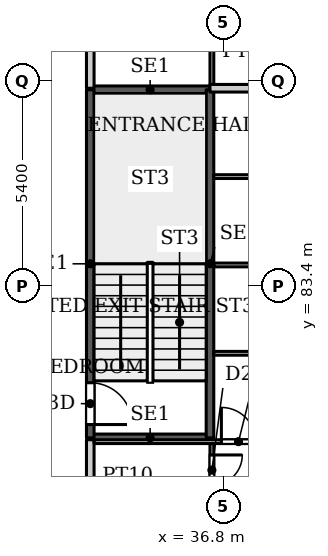
"""IFC4 building model, lengths in metres.
Left out: names, types, materials, properties, quantities, classifications, styles, units other than length and angle.
Written with IfcOpenShell. Run it as: python <this file> out.ifc"""

import sys

from ifc_helpers import new_model, si_unit, direction, frame, frame_2d, origin, place, context, subcontext, project, spatial, rectangle, extrude, source, transform, mapped, element, fill, save


model = new_model("IFC4")
c1 = context("Model", 3, precision=1e-05, world=origin(), true_north=direction((0.0, 1.0)))
c2 = subcontext(c1, "Body", "Model", "MODEL_VIEW")
j1 = project(units=[si_unit("LENGTHUNIT", "METRE"), si_unit("PLANEANGLEUNIT", "RADIAN")], contexts=[c1])
p1 = place(None, origin())
s1 = spatial("IfcSite", under=j1, at=p1, CompositionType="ELEMENT")
p2 = place(p1, origin())
s2 = spatial("IfcBuilding", under=s1, at=p2, CompositionType="ELEMENT")
p3 = place(p2, frame((0.0, 0.0, 129.2)))
s3 = spatial("IfcBuildingStorey", under=s2, at=p3, CompositionType="ELEMENT", Elevation=129.2)
for number, where, z_axis, x_axis in (
    (1, (33.3, 79.4, 0.0), (0.0, 0.0, 1.0), (1.0, 0.0, 0.0)),
    (2, (33.3, 88.56, 0.0), (0.0, 0.0, 1.0), (1.0, 0.0, 0.0)),
):
    element("IfcWall", number, at=place(p3, frame(where, z_axis=z_axis, x_axis=x_axis)), inside=s3, PredefinedType="SHEAR", context=c2, shape_type="SweptSolid", body=[
        extrude(rectangle(XDim=3.15, YDim=0.2, at=frame_2d((1.575, 0.0))), origin(), (0.0, 0.0, 1.0), 3.9),
    ])
p4 = place(p3, frame((33.3, 79.4, 0.0), z_axis=(0.0, 0.0, 1.0), x_axis=(0.0, 1.0, 0.0)))
e3 = element("IfcWall", 3, at=p4, inside=s3, PredefinedType="SHEAR", context=c2, shape_type="SweptSolid", body=[
    extrude(rectangle(XDim=9.16, YDim=0.2, at=frame_2d((4.58, 0.0))), origin(), (0.0, 0.0, 1.0), 3.9),
])
p5 = place(p4, frame((0.35, 0.0, 0.0)))
e4 = element("IfcOpeningElement", 4, at=p5, cuts=e3, PredefinedType="OPENING", context=c2, shape_type="SweptSolid", body=[
    extrude(rectangle(XDim=1.1, YDim=2.2, at=frame_2d((0.55, 1.1))), frame((0.0, 0.11, 0.0), z_axis=(0.0, -1.0, 0.0), x_axis=(1.0, 0.0, 0.0)), (0.0, 0.0, 1.0), 0.22),
])
p6 = place(p3, frame((36.45, 79.4, 0.0), z_axis=(0.0, 0.0, 1.0), x_axis=(0.0, 1.0, 0.0)))
e5 = element("IfcWall", 5, at=p6, inside=s3, PredefinedType="SHEAR", context=c2, shape_type="SweptSolid", body=[
    extrude(rectangle(XDim=9.16, YDim=0.2, at=frame_2d((4.58, 0.0))), origin(), (0.0, 0.0, 1.0), 3.9),
])
p7 = place(p3, frame((33.3, 54.4, 0.0), z_axis=(0.0, 0.0, 1.0), x_axis=(0.0, 1.0, 0.0)))
e6 = element("IfcWall", 6, at=p7, inside=s3, PredefinedType="PARTITIONING", context=c2, shape_type="SweptSolid", body=[
    extrude(rectangle(XDim=24.95, YDim=0.2, at=frame_2d((12.475, 0.0))), origin(), (0.0, 0.0, 1.0), 3.6),
])
p8 = place(p7, frame((0.25, 0.0, 0.0)))
e7 = element("IfcOpeningElement", 7, at=p8, cuts=e6, PredefinedType="OPENING", context=c2, shape_type="SweptSolid", body=[
    extrude(rectangle(XDim=1.0, YDim=2.1, at=frame_2d((0.5, 1.05))), frame((0.0, 0.11, 0.0), z_axis=(0.0, -1.0, 0.0), x_axis=(1.0, 0.0, 0.0)), (0.0, 0.0, 1.0), 0.22),
])
p9 = place(p7, frame((20.5, 0.0, 0.0)))
e8 = element("IfcOpeningElement", 8, at=p9, cuts=e6, PredefinedType="OPENING", context=c2, shape_type="SweptSolid", body=[
    extrude(rectangle(XDim=1.0, YDim=2.1, at=frame_2d((0.5, 1.05))), frame((0.0, 0.11, 0.0), z_axis=(0.0, -1.0, 0.0), x_axis=(1.0, 0.0, 0.0)), (0.0, 0.0, 1.0), 0.22),
])
p10 = place(p3, frame((33.3, 88.6, 0.0), z_axis=(0.0, 0.0, 1.0), x_axis=(0.0, 1.0, 0.0)))
e9 = element("IfcWall", 9, at=p10, inside=s3, PredefinedType="PARTITIONING", context=c2, shape_type="SweptSolid", body=[
    extrude(rectangle(XDim=5.175, YDim=0.2, at=frame_2d((2.587, 0.0))), origin(), (0.0, 0.0, 1.0), 3.6),
])
p11 = place(p10, frame((3.7, 0.0, 0.0)))
e10 = element("IfcOpeningElement", 10, at=p11, cuts=e9, PredefinedType="OPENING", context=c2, shape_type="SweptSolid", body=[
    extrude(rectangle(XDim=1.0, YDim=2.1, at=frame_2d((0.5, 1.05))), frame((0.0, 0.11, 0.0), z_axis=(0.0, -1.0, 0.0), x_axis=(1.0, 0.0, 0.0)), (0.0, 0.0, 1.0), 0.22),
])
p12 = place(p3, frame((33.4, 79.3, 0.0), z_axis=(0.0, 0.0, 1.0), x_axis=(1.0, 0.0, 0.0)))
e11 = element("IfcWall", 11, at=p12, inside=s3, PredefinedType="PARTITIONING", context=c2, shape_type="SweptSolid", body=[
    extrude(rectangle(XDim=12.5, YDim=0.1, at=frame_2d((6.25, 0.0))), origin(), (0.0, 0.0, 1.0), 3.6),
])
p13 = place(p12, frame((3.35, 0.0, 0.0)))
e12 = element("IfcOpeningElement", 12, at=p13, cuts=e11, PredefinedType="OPENING", context=c2, shape_type="SweptSolid", body=[
    extrude(rectangle(XDim=0.9, YDim=2.1, at=frame_2d((0.45, 1.05))), frame((0.0, 0.06, 0.0), z_axis=(0.0, -1.0, 0.0), x_axis=(1.0, 0.0, 0.0)), (0.0, 0.0, 1.0), 0.12),
])
p14 = place(p3, frame((36.45, 88.6, 0.0), z_axis=(0.0, 0.0, 1.0), x_axis=(1.0, 0.0, 0.0)))
e13 = element("IfcWall", 13, at=p14, inside=s3, PredefinedType="PARTITIONING", context=c2, shape_type="SweptSolid", body=[
    extrude(rectangle(XDim=9.45, YDim=0.2, at=frame_2d((4.725, 0.0))), origin(), (0.0, 0.0, 1.0), 2.5),
])
p15 = place(p3, frame((36.5, 76.375, 0.0), z_axis=(0.0, 0.0, 1.0), x_axis=(0.0, 1.0, 0.0)))
e14 = element("IfcWall", 14, at=p15, inside=s3, PredefinedType="PARTITIONING", context=c2, shape_type="SweptSolid", body=[
    extrude(rectangle(XDim=2.875, YDim=0.1, at=frame_2d((1.438, 0.0))), origin(), (0.0, 0.0, 1.0), 3.6),
])
p16 = place(p15, frame((1.775, 0.0, 0.0)))
e15 = element("IfcOpeningElement", 15, at=p16, cuts=e14, PredefinedType="OPENING", context=c2, shape_type="SweptSolid", body=[
    extrude(rectangle(XDim=0.8, YDim=2.1, at=frame_2d((0.4, 1.05))), frame((0.0, 0.06, 0.0), z_axis=(0.0, -1.0, 0.0), x_axis=(1.0, 0.0, 0.0)), (0.0, 0.0, 1.0), 0.12),
])
p17 = place(p3, frame((36.5, 88.7, 0.0), z_axis=(0.0, 0.0, 1.0), x_axis=(0.0, 1.0, 0.0)))
e16 = element("IfcWall", 16, at=p17, inside=s3, PredefinedType="PARTITIONING", context=c2, shape_type="SweptSolid", body=[
    extrude(rectangle(XDim=3.25, YDim=0.1, at=frame_2d((1.625, 0.0))), origin(), (0.0, 0.0, 1.0), 3.6),
])
p18 = place(p17, frame((1.1, 0.0, 0.0)))
e17 = element("IfcOpeningElement", 17, at=p18, cuts=e16, PredefinedType="OPENING", context=c2, shape_type="SweptSolid", body=[
    extrude(rectangle(XDim=0.9, YDim=2.1, at=frame_2d((0.45, 1.05))), frame((0.0, 0.06, 0.0), z_axis=(0.0, -1.0, 0.0), x_axis=(1.0, 0.0, 0.0)), (0.0, 0.0, 1.0), 0.12),
])
p19 = place(p3, frame((36.549, 81.625, 0.0), z_axis=(0.0, 0.0, 1.0), x_axis=(1.0, 0.0, 0.0)))
e18 = element("IfcWall", 18, at=p19, inside=s3, PredefinedType="PARTITIONING", context=c2, shape_type="SweptSolid", body=[
    extrude(rectangle(XDim=9.351, YDim=0.1, at=frame_2d((4.675, 0.0))), origin(), (0.0, 0.0, 1.0), 3.6),
])
p20 = place(p19, frame((4.176, 0.0, 0.0)))
e19 = element("IfcOpeningElement", 19, at=p20, cuts=e18, PredefinedType="OPENING", context=c2, shape_type="SweptSolid", body=[
    extrude(rectangle(XDim=0.9, YDim=2.1, at=frame_2d((0.45, 1.05))), frame((0.0, 0.06, 0.0), z_axis=(0.0, -1.0, 0.0), x_axis=(1.0, 0.0, 0.0)), (0.0, 0.0, 1.0), 0.12),
])
p21 = place(p3, frame((36.549, 83.95, 0.0), z_axis=(0.0, 0.0, 1.0), x_axis=(1.0, 0.0, 0.0)))
e20 = element("IfcWall", 20, at=p21, inside=s3, PredefinedType="PARTITIONING", context=c2, shape_type="SweptSolid", body=[
    extrude(rectangle(XDim=9.351, YDim=0.1, at=frame_2d((4.675, 0.0))), origin(), (0.0, 0.0, 1.0), 3.6),
])
p22 = place(p21, frame((4.176, 0.0, 0.0)))
e21 = element("IfcOpeningElement", 21, at=p22, cuts=e20, PredefinedType="OPENING", context=c2, shape_type="SweptSolid", body=[
    extrude(rectangle(XDim=0.9, YDim=2.1, at=frame_2d((0.45, 1.05))), frame((0.0, 0.06, 0.0), z_axis=(0.0, -1.0, 0.0), x_axis=(1.0, 0.0, 0.0)), (0.0, 0.0, 1.0), 0.12),
])
p23 = place(p3, frame((36.549, 86.275, 0.0), z_axis=(0.0, 0.0, 1.0), x_axis=(1.0, 0.0, 0.0)))
e22 = element("IfcWall", 22, at=p23, inside=s3, PredefinedType="PARTITIONING", context=c2, shape_type="SweptSolid", body=[
    extrude(rectangle(XDim=9.351, YDim=0.1, at=frame_2d((4.675, 0.0))), origin(), (0.0, 0.0, 1.0), 3.6),
])
p24 = place(p23, frame((4.176, 0.0, 0.0)))
e23 = element("IfcOpeningElement", 23, at=p24, cuts=e22, PredefinedType="OPENING", context=c2, shape_type="SweptSolid", body=[
    extrude(rectangle(XDim=0.9, YDim=2.1, at=frame_2d((0.45, 1.05))), frame((0.0, 0.06, 0.0), z_axis=(0.0, -1.0, 0.0), x_axis=(1.0, 0.0, 0.0)), (0.0, 0.0, 1.0), 0.12),
])
m1 = source(origin(), c2, "Body", "SweptSolid", [
    extrude(rectangle(XDim=1.1, YDim=2.2, at=frame_2d((0.55, 1.1))), frame((0.0, 0.025, 0.0), z_axis=(0.0, -1.0, 0.0), x_axis=(1.0, 0.0, 0.0)), (0.0, 0.0, 1.0), 0.05),
])
p25 = place(p5, origin())
e24 = element("IfcDoor", 24, at=p25, inside=s3, OperationType="SINGLE_SWING_RIGHT", PredefinedType="DOOR", context=c2, shape_type="MappedRepresentation", body=[
    mapped(m1, transform((0.0, 0.0, 0.0), x_axis=(1.0, 0.0, 0.0), y_axis=(0.0, 1.0, 0.0), z_axis=(0.0, 0.0, 1.0), scale=1.0)),
])
fill(e4, e24)
m2 = source(origin(), c2, "Body", "SweptSolid", [
    extrude(rectangle(XDim=0.8, YDim=2.1, at=frame_2d((0.4, 1.05))), frame((0.0, 0.025, 0.0), z_axis=(0.0, -1.0, 0.0), x_axis=(1.0, 0.0, 0.0)), (0.0, 0.0, 1.0), 0.05),
])
p26 = place(p16, origin())
e25 = element("IfcDoor", 25, at=p26, inside=s3, OperationType="SINGLE_SWING_RIGHT", PredefinedType="DOOR", context=c2, shape_type="MappedRepresentation", body=[
    mapped(m2, transform((0.0, 0.0, 0.0), x_axis=(1.0, 0.0, 0.0), y_axis=(0.0, 1.0, 0.0), z_axis=(0.0, 0.0, 1.0), scale=1.0)),
])
fill(e15, e25)
m3 = source(origin(), c2, "Body", "SweptSolid", [
    extrude(rectangle(XDim=0.9, YDim=2.1, at=frame_2d((0.45, 1.05))), frame((0.0, 0.025, 0.0), z_axis=(0.0, -1.0, 0.0), x_axis=(1.0, 0.0, 0.0)), (0.0, 0.0, 1.0), 0.05),
])
p27 = place(p13, origin())
e26 = element("IfcDoor", 26, at=p27, inside=s3, OperationType="SINGLE_SWING_LEFT", PredefinedType="DOOR", context=c2, shape_type="MappedRepresentation", body=[
    mapped(m3, transform((0.0, 0.0, 0.0), x_axis=(1.0, 0.0, 0.0), y_axis=(0.0, 1.0, 0.0), z_axis=(0.0, 0.0, 1.0), scale=1.0)),
])
fill(e12, e26)
save(model, sys.argv[1])
